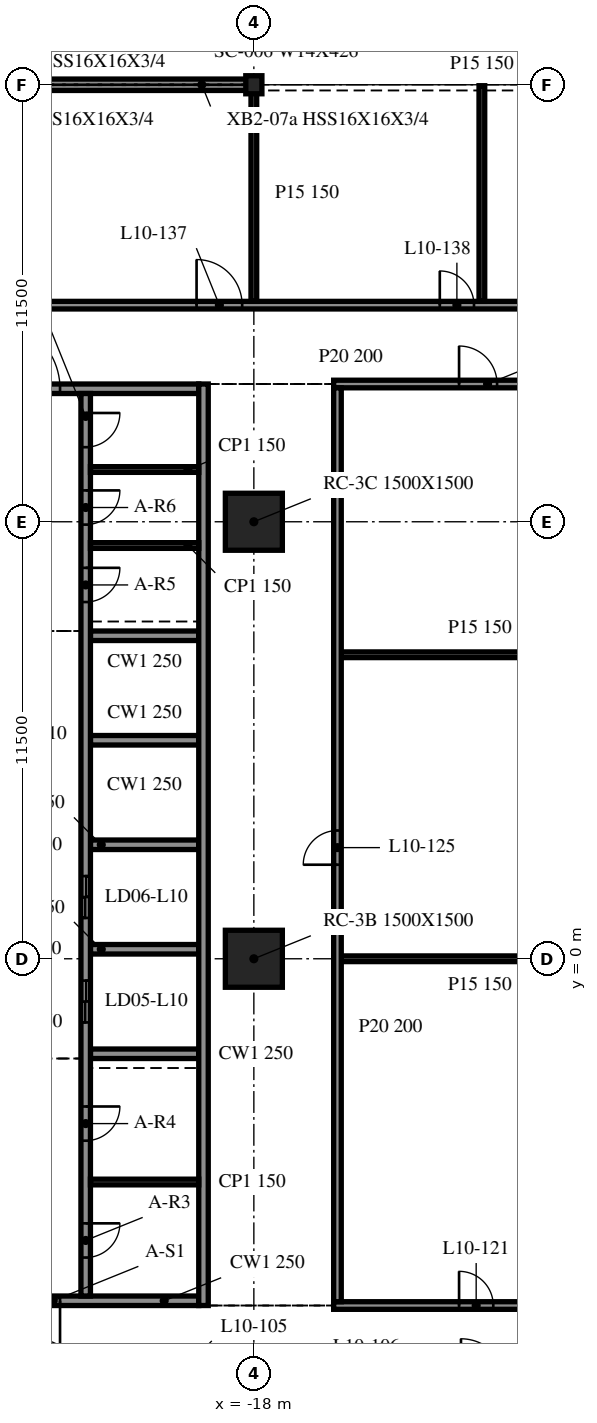
"""IFC4 building model, lengths in metres.
Left out: names, types, materials, properties, quantities, classifications, styles, units other than length and angle.
Written with IfcOpenShell. Run it as: python <this file> out.ifc"""

import sys

from ifc_helpers import new_model, si_unit, direction, frame, frame_2d, origin, origin_2d, place, context, subcontext, project, spatial, rectangle, i_section, extrude, element, fill, save


model = new_model("IFC4")
c1 = context("Model", 3, precision=1e-05, world=origin(), true_north=direction((0.0, 1.0)))
c2 = subcontext(c1, "Body", "Model", "MODEL_VIEW")
j1 = project(units=[si_unit("LENGTHUNIT", "METRE"), si_unit("PLANEANGLEUNIT", "RADIAN")], contexts=[c1])
p1 = place(None, origin())
s1 = spatial("IfcSite", under=j1, at=p1, CompositionType="ELEMENT")
p2 = place(p1, origin())
s2 = spatial("IfcBuilding", under=s1, at=p2, CompositionType="ELEMENT")
p3 = place(p2, frame((0.0, 0.0, 46.0)))
s3 = spatial("IfcBuildingStorey", under=s2, at=p3, CompositionType="ELEMENT", Elevation=46.0)
for number, where, z_axis, x_axis in (
    (1, (-18.0, 0.0, -0.34), (0.0, 0.0, 1.0), (1.0, 0.0, 0.0)),
    (2, (-18.0, 11.5, -0.34), (0.0, 0.0, 1.0), (1.0, 0.0, 0.0)),
):
    element("IfcColumn", number, at=place(p3, frame(where, z_axis=z_axis, x_axis=x_axis)), inside=s3, PredefinedType="COLUMN", context=c2, shape_type="SweptSolid", body=[
        extrude(rectangle(XDim=1.5, YDim=1.5, at=origin_2d()), origin(), (0.0, 0.0, 1.0), 4.3),
    ])
p4 = place(p3, frame((-18.0, 23.0, -0.34), z_axis=(0.0, 0.0, 1.0), x_axis=(1.0, 0.0, 0.0)))
e3 = element("IfcColumn", 3, at=p4, inside=s3, PredefinedType="COLUMN", context=c2, shape_type="SweptSolid", body=[
    extrude(i_section(OverallWidth=0.424, OverallDepth=0.475, WebThickness=0.048, FlangeThickness=0.077, at=origin_2d()), origin(), (0.0, 0.0, 1.0), 4.3),
])
p5 = place(p3, frame((-18.024, 23.0, 0.0), z_axis=(0.0, 0.0, 1.0), x_axis=(-1.0, 0.0, 0.0)))
e4 = element("IfcWall", 4, at=p5, inside=s3, PredefinedType="NOTDEFINED", context=c2, shape_type="SweptSolid", body=[
    extrude(rectangle(XDim=11.952, YDim=0.3, at=frame_2d((5.976, 0.0))), origin(), (0.0, 0.0, 1.0), 3.203),
])
p6 = place(p3, frame((-19.325, -9.125, 0.0), z_axis=(0.0, 0.0, 1.0), x_axis=(0.0, 1.0, 0.0)))
e5 = element("IfcWall", 5, at=p6, inside=s3, PredefinedType="SOLIDWALL", context=c2, shape_type="SweptSolid", body=[
    extrude(rectangle(XDim=24.25, YDim=0.25, at=frame_2d((12.125, 0.0))), origin(), (0.0, 0.0, 1.0), 3.96),
])
p7 = place(p3, frame((-19.45, -9.0, 0.0), z_axis=(0.0, 0.0, 1.0), x_axis=(-1.0, 0.0, 0.0)))
e6 = element("IfcWall", 6, at=p7, inside=s3, PredefinedType="SOLIDWALL", context=c2, shape_type="SweptSolid", body=[
    extrude(rectangle(XDim=9.1, YDim=0.25, at=frame_2d((4.55, 0.0))), origin(), (0.0, 0.0, 1.0), 3.96),
])
p8 = place(p7, frame((3.65, 0.0, 0.0)))
e7 = element("IfcOpeningElement", 7, at=p8, cuts=e6, PredefinedType="OPENING", context=c2, shape_type="SweptSolid", body=[
    extrude(rectangle(XDim=1.8, YDim=2.1, at=frame_2d((0.9, 1.05))), frame((0.0, 0.135, 0.0), z_axis=(0.0, -1.0, 0.0), x_axis=(1.0, 0.0, 0.0)), (0.0, 0.0, 1.0), 0.27),
])
p9 = place(p3, frame((-28.55, 15.0, 0.0), z_axis=(0.0, 0.0, 1.0), x_axis=(1.0, 0.0, 0.0)))
e8 = element("IfcWall", 8, at=p9, inside=s3, PredefinedType="SOLIDWALL", context=c2, shape_type="SweptSolid", body=[
    extrude(rectangle(XDim=9.1, YDim=0.25, at=frame_2d((4.55, 0.0))), origin(), (0.0, 0.0, 1.0), 3.96),
])
p10 = place(p9, frame((3.65, 0.0, 0.0)))
e9 = element("IfcOpeningElement", 9, at=p10, cuts=e8, PredefinedType="OPENING", context=c2, shape_type="SweptSolid", body=[
    extrude(rectangle(XDim=1.8, YDim=2.1, at=frame_2d((0.9, 1.05))), frame((0.0, 0.135, 0.0), z_axis=(0.0, -1.0, 0.0), x_axis=(1.0, 0.0, 0.0)), (0.0, 0.0, 1.0), 0.27),
])
p11 = place(p3, frame((-22.425, 14.875, 0.0), z_axis=(0.0, 0.0, 1.0), x_axis=(0.0, -1.0, 0.0)))
e10 = element("IfcWall", 10, at=p11, inside=s3, PredefinedType="SOLIDWALL", context=c2, shape_type="SweptSolid", body=[
    extrude(rectangle(XDim=23.75, YDim=0.25, at=frame_2d((11.875, 0.0))), origin(), (0.0, 0.0, 1.0), 3.96),
])
p12 = place(p11, frame((15.45, 0.0, 0.0)))
e11 = element("IfcOpeningElement", 11, at=p12, cuts=e10, PredefinedType="OPENING", context=c2, shape_type="SweptSolid", body=[
    extrude(rectangle(XDim=1.1, YDim=2.1, at=frame_2d((0.55, 1.05))), frame((0.0, 0.135, 0.0), z_axis=(0.0, -1.0, 0.0), x_axis=(1.0, 0.0, 0.0)), (0.0, 0.0, 1.0), 0.27),
])
p13 = place(p11, frame((12.7, 0.0, 0.0)))
e12 = element("IfcOpeningElement", 12, at=p13, cuts=e10, PredefinedType="OPENING", context=c2, shape_type="SweptSolid", body=[
    extrude(rectangle(XDim=1.1, YDim=2.1, at=frame_2d((0.55, 1.05))), frame((0.0, 0.135, 0.0), z_axis=(0.0, -1.0, 0.0), x_axis=(1.0, 0.0, 0.0)), (0.0, 0.0, 1.0), 0.27),
])
p14 = place(p11, frame((21.837, 0.0, 0.0)))
e13 = element("IfcOpeningElement", 13, at=p14, cuts=e10, PredefinedType="OPENING", context=c2, shape_type="SweptSolid", body=[
    extrude(rectangle(XDim=0.9, YDim=2.1, at=frame_2d((0.45, 1.05))), frame((0.0, 0.135, 0.0), z_axis=(0.0, -1.0, 0.0), x_axis=(1.0, 0.0, 0.0)), (0.0, 0.0, 1.0), 0.27),
])
p15 = place(p11, frame((18.762, 0.0, 0.0)))
e14 = element("IfcOpeningElement", 14, at=p15, cuts=e10, PredefinedType="OPENING", context=c2, shape_type="SweptSolid", body=[
    extrude(rectangle(XDim=0.9, YDim=2.1, at=frame_2d((0.45, 1.05))), frame((0.0, 0.135, 0.0), z_axis=(0.0, -1.0, 0.0), x_axis=(1.0, 0.0, 0.0)), (0.0, 0.0, 1.0), 0.27),
])
p16 = place(p11, frame((4.587, 0.0, 0.0)))
e15 = element("IfcOpeningElement", 15, at=p16, cuts=e10, PredefinedType="OPENING", context=c2, shape_type="SweptSolid", body=[
    extrude(rectangle(XDim=0.9, YDim=2.1, at=frame_2d((0.45, 1.05))), frame((0.0, 0.135, 0.0), z_axis=(0.0, -1.0, 0.0), x_axis=(1.0, 0.0, 0.0)), (0.0, 0.0, 1.0), 0.27),
])
p17 = place(p11, frame((2.55, 0.0, 0.0)))
e16 = element("IfcOpeningElement", 16, at=p17, cuts=e10, PredefinedType="OPENING", context=c2, shape_type="SweptSolid", body=[
    extrude(rectangle(XDim=0.9, YDim=2.1, at=frame_2d((0.45, 1.05))), frame((0.0, 0.135, 0.0), z_axis=(0.0, -1.0, 0.0), x_axis=(1.0, 0.0, 0.0)), (0.0, 0.0, 1.0), 0.27),
])
p18 = place(p11, frame((0.512, 0.0, 0.0)))
e17 = element("IfcOpeningElement", 17, at=p18, cuts=e10, PredefinedType="OPENING", context=c2, shape_type="SweptSolid", body=[
    extrude(rectangle(XDim=0.9, YDim=2.1, at=frame_2d((0.45, 1.05))), frame((0.0, 0.135, 0.0), z_axis=(0.0, -1.0, 0.0), x_axis=(1.0, 0.0, 0.0)), (0.0, 0.0, 1.0), 0.27),
])
for number, where, z_axis, x_axis in (
    (18, (-22.3, -2.5, 0.0), (0.0, 0.0, 1.0), (1.0, 0.0, 0.0)),
    (19, (-22.3, 0.25, 0.0), (0.0, 0.0, 1.0), (1.0, 0.0, 0.0)),
    (20, (-22.3, 3.0, 0.0), (0.0, 0.0, 1.0), (1.0, 0.0, 0.0)),
    (21, (-22.3, 5.75, 0.0), (0.0, 0.0, 1.0), (1.0, 0.0, 0.0)),
    (22, (-22.3, 8.5, 0.0), (0.0, 0.0, 1.0), (1.0, 0.0, 0.0)),
):
    element("IfcWall", number, at=place(p3, frame(where, z_axis=z_axis, x_axis=x_axis)), inside=s3, PredefinedType="SOLIDWALL", context=c2, shape_type="SweptSolid", body=[
        extrude(rectangle(XDim=2.85, YDim=0.25, at=frame_2d((1.425, 0.0))), origin(), (0.0, 0.0, 1.0), 3.96),
    ])
for number, where, z_axis, x_axis in (
    (23, (-22.3, -5.875, 0.0), (0.0, 0.0, 1.0), (1.0, 0.0, 0.0)),
    (24, (-22.3, 10.875, 0.0), (0.0, 0.0, 1.0), (1.0, 0.0, 0.0)),
    (25, (-22.3, 12.875, 0.0), (0.0, 0.0, 1.0), (1.0, 0.0, 0.0)),
):
    element("IfcWall", number, at=place(p3, frame(where, z_axis=z_axis, x_axis=x_axis)), inside=s3, PredefinedType="PARTITIONING", context=c2, shape_type="SweptSolid", body=[
        extrude(rectangle(XDim=2.85, YDim=0.15, at=frame_2d((1.425, 0.0))), origin(), (0.0, 0.0, 1.0), 3.96),
    ])
p19 = place(p3, frame((-15.9, -9.125, 0.0), z_axis=(0.0, 0.0, 1.0), x_axis=(1.0, 0.0, 0.0)))
e26 = element("IfcWall", 26, at=p19, inside=s3, PredefinedType="PARTITIONING", context=c2, shape_type="SweptSolid", body=[
    extrude(rectangle(XDim=7.7, YDim=0.2, at=frame_2d((3.85, 0.0))), origin(), (0.0, 0.0, 1.0), 3.96),
])
p20 = place(p19, frame((3.3, 0.0, 0.0)))
e27 = element("IfcOpeningElement", 27, at=p20, cuts=e26, PredefinedType="OPENING", context=c2, shape_type="SweptSolid", body=[
    extrude(rectangle(XDim=0.9, YDim=2.1, at=frame_2d((0.45, 1.05))), frame((0.0, 0.11, 0.0), z_axis=(0.0, -1.0, 0.0), x_axis=(1.0, 0.0, 0.0)), (0.0, 0.0, 1.0), 0.22),
])
for number, where, z_axis, x_axis in (
    (28, (-15.7, 0.0, 0.0), (0.0, 0.0, 1.0), (1.0, 0.0, 0.0)),
    (29, (-15.7, 8.0, 0.0), (0.0, 0.0, 1.0), (1.0, 0.0, 0.0)),
):
    element("IfcWall", number, at=place(p3, frame(where, z_axis=z_axis, x_axis=x_axis)), inside=s3, PredefinedType="PARTITIONING", context=c2, shape_type="SweptSolid", body=[
        extrude(rectangle(XDim=7.3, YDim=0.15, at=frame_2d((3.65, 0.0))), origin(), (0.0, 0.0, 1.0), 3.96),
    ])
p21 = place(p3, frame((-15.9, 15.125, 0.0), z_axis=(0.0, 0.0, 1.0), x_axis=(1.0, 0.0, 0.0)))
e30 = element("IfcWall", 30, at=p21, inside=s3, PredefinedType="PARTITIONING", context=c2, shape_type="SweptSolid", body=[
    extrude(rectangle(XDim=7.7, YDim=0.2, at=frame_2d((3.85, 0.0))), origin(), (0.0, 0.0, 1.0), 3.96),
])
p22 = place(p21, frame((3.3, 0.0, 0.0)))
e31 = element("IfcOpeningElement", 31, at=p22, cuts=e30, PredefinedType="OPENING", context=c2, shape_type="SweptSolid", body=[
    extrude(rectangle(XDim=1.0, YDim=2.1, at=frame_2d((0.5, 1.05))), frame((0.0, 0.11, 0.0), z_axis=(0.0, -1.0, 0.0), x_axis=(1.0, 0.0, 0.0)), (0.0, 0.0, 1.0), 0.22),
])
p23 = place(p3, frame((-41.807, 17.2, 0.0), z_axis=(0.0, 0.0, 1.0), x_axis=(1.0, 0.0, 0.0)))
e32 = element("IfcWall", 32, at=p23, inside=s3, PredefinedType="PARTITIONING", context=c2, shape_type="SweptSolid", body=[
    extrude(rectangle(XDim=95.615, YDim=0.2, at=frame_2d((47.807, 0.0))), origin(), (0.0, 0.0, 1.0), 3.96),
])
p24 = place(p23, frame((7.5, 0.0, 0.0)))
e33 = element("IfcOpeningElement", 33, at=p24, cuts=e32, PredefinedType="OPENING", context=c2, shape_type="SweptSolid", body=[
    extrude(rectangle(XDim=1.0, YDim=2.1, at=frame_2d((0.5, 1.05))), frame((0.0, 0.11, 0.0), z_axis=(0.0, -1.0, 0.0), x_axis=(1.0, 0.0, 0.0)), (0.0, 0.0, 1.0), 0.22),
])
p25 = place(p23, frame((10.9, 0.0, 0.0)))
e34 = element("IfcOpeningElement", 34, at=p25, cuts=e32, PredefinedType="OPENING", context=c2, shape_type="SweptSolid", body=[
    extrude(rectangle(XDim=1.0, YDim=2.1, at=frame_2d((0.5, 1.05))), frame((0.0, 0.11, 0.0), z_axis=(0.0, -1.0, 0.0), x_axis=(1.0, 0.0, 0.0)), (0.0, 0.0, 1.0), 0.22),
])
p26 = place(p23, frame((13.7, 0.0, 0.0)))
e35 = element("IfcOpeningElement", 35, at=p26, cuts=e32, PredefinedType="OPENING", context=c2, shape_type="SweptSolid", body=[
    extrude(rectangle(XDim=0.9, YDim=2.1, at=frame_2d((0.45, 1.05))), frame((0.0, 0.11, 0.0), z_axis=(0.0, -1.0, 0.0), x_axis=(1.0, 0.0, 0.0)), (0.0, 0.0, 1.0), 0.22),
])
p27 = place(p23, frame((22.3, 0.0, 0.0)))
e36 = element("IfcOpeningElement", 36, at=p27, cuts=e32, PredefinedType="OPENING", context=c2, shape_type="SweptSolid", body=[
    extrude(rectangle(XDim=1.2, YDim=2.1, at=frame_2d((0.6, 1.05))), frame((0.0, 0.11, 0.0), z_axis=(0.0, -1.0, 0.0), x_axis=(1.0, 0.0, 0.0)), (0.0, 0.0, 1.0), 0.22),
])
p28 = place(p23, frame((28.7, 0.0, 0.0)))
e37 = element("IfcOpeningElement", 37, at=p28, cuts=e32, PredefinedType="OPENING", context=c2, shape_type="SweptSolid", body=[
    extrude(rectangle(XDim=0.9, YDim=2.1, at=frame_2d((0.45, 1.05))), frame((0.0, 0.11, 0.0), z_axis=(0.0, -1.0, 0.0), x_axis=(1.0, 0.0, 0.0)), (0.0, 0.0, 1.0), 0.22),
])
p29 = place(p23, frame((37.5, 0.0, 0.0)))
e38 = element("IfcOpeningElement", 38, at=p29, cuts=e32, PredefinedType="OPENING", context=c2, shape_type="SweptSolid", body=[
    extrude(rectangle(XDim=1.0, YDim=2.1, at=frame_2d((0.5, 1.05))), frame((0.0, 0.11, 0.0), z_axis=(0.0, -1.0, 0.0), x_axis=(1.0, 0.0, 0.0)), (0.0, 0.0, 1.0), 0.22),
])
p30 = place(p23, frame((40.9, 0.0, 0.0)))
e39 = element("IfcOpeningElement", 39, at=p30, cuts=e32, PredefinedType="OPENING", context=c2, shape_type="SweptSolid", body=[
    extrude(rectangle(XDim=1.0, YDim=2.1, at=frame_2d((0.5, 1.05))), frame((0.0, 0.11, 0.0), z_axis=(0.0, -1.0, 0.0), x_axis=(1.0, 0.0, 0.0)), (0.0, 0.0, 1.0), 0.22),
])
p31 = place(p23, frame((43.7, 0.0, 0.0)))
e40 = element("IfcOpeningElement", 40, at=p31, cuts=e32, PredefinedType="OPENING", context=c2, shape_type="SweptSolid", body=[
    extrude(rectangle(XDim=0.9, YDim=2.1, at=frame_2d((0.45, 1.05))), frame((0.0, 0.11, 0.0), z_axis=(0.0, -1.0, 0.0), x_axis=(1.0, 0.0, 0.0)), (0.0, 0.0, 1.0), 0.22),
])
p32 = place(p23, frame((47.3, 0.0, 0.0)))
e41 = element("IfcOpeningElement", 41, at=p32, cuts=e32, PredefinedType="OPENING", context=c2, shape_type="SweptSolid", body=[
    extrude(rectangle(XDim=1.2, YDim=2.1, at=frame_2d((0.6, 1.05))), frame((0.0, 0.11, 0.0), z_axis=(0.0, -1.0, 0.0), x_axis=(1.0, 0.0, 0.0)), (0.0, 0.0, 1.0), 0.22),
])
p33 = place(p23, frame((54.1, 0.0, 0.0)))
e42 = element("IfcOpeningElement", 42, at=p33, cuts=e32, PredefinedType="OPENING", context=c2, shape_type="SweptSolid", body=[
    extrude(rectangle(XDim=0.9, YDim=2.1, at=frame_2d((0.45, 1.05))), frame((0.0, 0.11, 0.0), z_axis=(0.0, -1.0, 0.0), x_axis=(1.0, 0.0, 0.0)), (0.0, 0.0, 1.0), 0.22),
])
p34 = place(p23, frame((60.1, 0.0, 0.0)))
e43 = element("IfcOpeningElement", 43, at=p34, cuts=e32, PredefinedType="OPENING", context=c2, shape_type="SweptSolid", body=[
    extrude(rectangle(XDim=1.0, YDim=2.1, at=frame_2d((0.5, 1.05))), frame((0.0, 0.11, 0.0), z_axis=(0.0, -1.0, 0.0), x_axis=(1.0, 0.0, 0.0)), (0.0, 0.0, 1.0), 0.22),
])
p35 = place(p23, frame((69.1, 0.0, 0.0)))
e44 = element("IfcOpeningElement", 44, at=p35, cuts=e32, PredefinedType="OPENING", context=c2, shape_type="SweptSolid", body=[
    extrude(rectangle(XDim=1.0, YDim=2.1, at=frame_2d((0.5, 1.05))), frame((0.0, 0.11, 0.0), z_axis=(0.0, -1.0, 0.0), x_axis=(1.0, 0.0, 0.0)), (0.0, 0.0, 1.0), 0.22),
])
p36 = place(p23, frame((72.5, 0.0, 0.0)))
e45 = element("IfcOpeningElement", 45, at=p36, cuts=e32, PredefinedType="OPENING", context=c2, shape_type="SweptSolid", body=[
    extrude(rectangle(XDim=0.9, YDim=2.1, at=frame_2d((0.45, 1.05))), frame((0.0, 0.11, 0.0), z_axis=(0.0, -1.0, 0.0), x_axis=(1.0, 0.0, 0.0)), (0.0, 0.0, 1.0), 0.22),
])
p37 = place(p23, frame((75.1, 0.0, 0.0)))
e46 = element("IfcOpeningElement", 46, at=p37, cuts=e32, PredefinedType="OPENING", context=c2, shape_type="SweptSolid", body=[
    extrude(rectangle(XDim=1.2, YDim=2.1, at=frame_2d((0.6, 1.05))), frame((0.0, 0.11, 0.0), z_axis=(0.0, -1.0, 0.0), x_axis=(1.0, 0.0, 0.0)), (0.0, 0.0, 1.0), 0.22),
])
p38 = place(p23, frame((84.1, 0.0, 0.0)))
e47 = element("IfcOpeningElement", 47, at=p38, cuts=e32, PredefinedType="OPENING", context=c2, shape_type="SweptSolid", body=[
    extrude(rectangle(XDim=0.9, YDim=2.1, at=frame_2d((0.45, 1.05))), frame((0.0, 0.11, 0.0), z_axis=(0.0, -1.0, 0.0), x_axis=(1.0, 0.0, 0.0)), (0.0, 0.0, 1.0), 0.22),
])
p39 = place(p23, frame((90.1, 0.0, 0.0)))
e48 = element("IfcOpeningElement", 48, at=p39, cuts=e32, PredefinedType="OPENING", context=c2, shape_type="SweptSolid", body=[
    extrude(rectangle(XDim=1.0, YDim=2.1, at=frame_2d((0.5, 1.05))), frame((0.0, 0.11, 0.0), z_axis=(0.0, -1.0, 0.0), x_axis=(1.0, 0.0, 0.0)), (0.0, 0.0, 1.0), 0.22),
])
p40 = place(p3, frame((-18.0, 17.3, 0.0), z_axis=(0.0, 0.0, 1.0), x_axis=(0.0, 1.0, 0.0)))
e49 = element("IfcWall", 49, at=p40, inside=s3, PredefinedType="PARTITIONING", context=c2, shape_type="SweptSolid", body=[
    extrude(rectangle(XDim=5.675, YDim=0.15, at=frame_2d((2.837, 0.0))), origin(), (0.0, 0.0, 1.0), 3.96),
])
p41 = place(p3, frame((-15.8, -9.025, 0.0), z_axis=(0.0, 0.0, 1.0), x_axis=(0.0, 1.0, 0.0)))
e50 = element("IfcWall", 50, at=p41, inside=s3, PredefinedType="PARTITIONING", context=c2, shape_type="SweptSolid", body=[
    extrude(rectangle(XDim=24.05, YDim=0.2, at=frame_2d((12.025, 0.0))), origin(), (0.0, 0.0, 1.0), 3.96),
])
p42 = place(p41, frame((11.5, 0.0, 0.0)))
e51 = element("IfcOpeningElement", 51, at=p42, cuts=e50, PredefinedType="OPENING", context=c2, shape_type="SweptSolid", body=[
    extrude(rectangle(XDim=0.9, YDim=2.1, at=frame_2d((0.45, 1.05))), frame((0.0, 0.11, 0.0), z_axis=(0.0, -1.0, 0.0), x_axis=(1.0, 0.0, 0.0)), (0.0, 0.0, 1.0), 0.22),
])
p43 = place(p3, frame((-12.0, 17.3, 0.0), z_axis=(0.0, 0.0, 1.0), x_axis=(0.0, 1.0, 0.0)))
e52 = element("IfcWall", 52, at=p43, inside=s3, PredefinedType="PARTITIONING", context=c2, shape_type="SweptSolid", body=[
    extrude(rectangle(XDim=5.675, YDim=0.15, at=frame_2d((2.837, 0.0))), origin(), (0.0, 0.0, 1.0), 3.96),
])
p44 = place(p8, origin())
e53 = element("IfcDoor", 53, at=p44, inside=s3, OperationType="DOUBLE_DOOR_SINGLE_SWING", PredefinedType="DOOR", context=c2, shape_type="SweptSolid", body=[
    extrude(rectangle(XDim=1.8, YDim=2.1, at=frame_2d((0.9, 1.05))), frame((0.0, 0.025, 0.0), z_axis=(0.0, -1.0, 0.0), x_axis=(1.0, 0.0, 0.0)), (0.0, 0.0, 1.0), 0.05),
])
fill(e7, e53)
p45 = place(p10, origin())
e54 = element("IfcDoor", 54, at=p45, inside=s3, OperationType="DOUBLE_DOOR_SINGLE_SWING", PredefinedType="DOOR", context=c2, shape_type="SweptSolid", body=[
    extrude(rectangle(XDim=1.8, YDim=2.1, at=frame_2d((0.9, 1.05))), frame((0.0, 0.025, 0.0), z_axis=(0.0, -1.0, 0.0), x_axis=(1.0, 0.0, 0.0)), (0.0, 0.0, 1.0), 0.05),
])
fill(e9, e54)
p46 = place(p12, origin())
e55 = element("IfcDoor", 55, at=p46, inside=s3, OperationType="DOUBLE_DOOR_SLIDING", PredefinedType="DOOR", context=c2, shape_type="SweptSolid", body=[
    extrude(rectangle(XDim=1.1, YDim=2.1, at=frame_2d((0.55, 1.05))), frame((0.0, 0.025, 0.0), z_axis=(0.0, -1.0, 0.0), x_axis=(1.0, 0.0, 0.0)), (0.0, 0.0, 1.0), 0.05),
])
fill(e11, e55)
p47 = place(p13, origin())
e56 = element("IfcDoor", 56, at=p47, inside=s3, OperationType="DOUBLE_DOOR_SLIDING", PredefinedType="DOOR", context=c2, shape_type="SweptSolid", body=[
    extrude(rectangle(XDim=1.1, YDim=2.1, at=frame_2d((0.55, 1.05))), frame((0.0, 0.025, 0.0), z_axis=(0.0, -1.0, 0.0), x_axis=(1.0, 0.0, 0.0)), (0.0, 0.0, 1.0), 0.05),
])
fill(e12, e56)
p48 = place(p14, origin())
e57 = element("IfcDoor", 57, at=p48, inside=s3, OperationType="SINGLE_SWING_LEFT", PredefinedType="DOOR", context=c2, shape_type="SweptSolid", body=[
    extrude(rectangle(XDim=0.9, YDim=2.1, at=frame_2d((0.45, 1.05))), frame((0.0, 0.025, 0.0), z_axis=(0.0, -1.0, 0.0), x_axis=(1.0, 0.0, 0.0)), (0.0, 0.0, 1.0), 0.05),
])
fill(e13, e57)
p49 = place(p15, origin())
e58 = element("IfcDoor", 58, at=p49, inside=s3, OperationType="SINGLE_SWING_RIGHT", PredefinedType="DOOR", context=c2, shape_type="SweptSolid", body=[
    extrude(rectangle(XDim=0.9, YDim=2.1, at=frame_2d((0.45, 1.05))), frame((0.0, 0.025, 0.0), z_axis=(0.0, -1.0, 0.0), x_axis=(1.0, 0.0, 0.0)), (0.0, 0.0, 1.0), 0.05),
])
fill(e14, e58)
p50 = place(p16, origin())
e59 = element("IfcDoor", 59, at=p50, inside=s3, OperationType="SINGLE_SWING_LEFT", PredefinedType="DOOR", context=c2, shape_type="SweptSolid", body=[
    extrude(rectangle(XDim=0.9, YDim=2.1, at=frame_2d((0.45, 1.05))), frame((0.0, 0.025, 0.0), z_axis=(0.0, -1.0, 0.0), x_axis=(1.0, 0.0, 0.0)), (0.0, 0.0, 1.0), 0.05),
])
fill(e15, e59)
p51 = place(p17, origin())
e60 = element("IfcDoor", 60, at=p51, inside=s3, OperationType="SINGLE_SWING_RIGHT", PredefinedType="DOOR", context=c2, shape_type="SweptSolid", body=[
    extrude(rectangle(XDim=0.9, YDim=2.1, at=frame_2d((0.45, 1.05))), frame((0.0, 0.025, 0.0), z_axis=(0.0, -1.0, 0.0), x_axis=(1.0, 0.0, 0.0)), (0.0, 0.0, 1.0), 0.05),
])
fill(e16, e60)
p52 = place(p18, origin())
e61 = element("IfcDoor", 61, at=p52, inside=s3, OperationType="SINGLE_SWING_LEFT", PredefinedType="DOOR", context=c2, shape_type="SweptSolid", body=[
    extrude(rectangle(XDim=0.9, YDim=2.1, at=frame_2d((0.45, 1.05))), frame((0.0, 0.025, 0.0), z_axis=(0.0, -1.0, 0.0), x_axis=(1.0, 0.0, 0.0)), (0.0, 0.0, 1.0), 0.05),
])
fill(e17, e61)
p53 = place(p20, origin())
e62 = element("IfcDoor", 62, at=p53, inside=s3, OperationType="SINGLE_SWING_LEFT", PredefinedType="DOOR", context=c2, shape_type="SweptSolid", body=[
    extrude(rectangle(XDim=0.9, YDim=2.1, at=frame_2d((0.45, 1.05))), frame((0.0, 0.025, 0.0), z_axis=(0.0, -1.0, 0.0), x_axis=(1.0, 0.0, 0.0)), (0.0, 0.0, 1.0), 0.05),
])
fill(e27, e62)
p54 = place(p42, origin())
e63 = element("IfcDoor", 63, at=p54, inside=s3, OperationType="SINGLE_SWING_RIGHT", PredefinedType="DOOR", context=c2, shape_type="SweptSolid", body=[
    extrude(rectangle(XDim=0.9, YDim=2.1, at=frame_2d((0.45, 1.05))), frame((0.0, 0.025, 0.0), z_axis=(0.0, -1.0, 0.0), x_axis=(1.0, 0.0, 0.0)), (0.0, 0.0, 1.0), 0.05),
])
fill(e51, e63)
p55 = place(p22, origin())
e64 = element("IfcDoor", 64, at=p55, inside=s3, OperationType="SINGLE_SWING_RIGHT", PredefinedType="DOOR", context=c2, shape_type="SweptSolid", body=[
    extrude(rectangle(XDim=1.0, YDim=2.1, at=frame_2d((0.5, 1.05))), frame((0.0, 0.025, 0.0), z_axis=(0.0, -1.0, 0.0), x_axis=(1.0, 0.0, 0.0)), (0.0, 0.0, 1.0), 0.05),
])
fill(e31, e64)
p56 = place(p27, origin())
e65 = element("IfcDoor", 65, at=p56, inside=s3, OperationType="SINGLE_SWING_LEFT", PredefinedType="DOOR", context=c2, shape_type="SweptSolid", body=[
    extrude(rectangle(XDim=1.2, YDim=2.1, at=frame_2d((0.6, 1.05))), frame((0.0, 0.025, 0.0), z_axis=(0.0, -1.0, 0.0), x_axis=(1.0, 0.0, 0.0)), (0.0, 0.0, 1.0), 0.05),
])
fill(e36, e65)
p57 = place(p28, origin())
e66 = element("IfcDoor", 66, at=p57, inside=s3, OperationType="SINGLE_SWING_LEFT", PredefinedType="DOOR", context=c2, shape_type="SweptSolid", body=[
    extrude(rectangle(XDim=0.9, YDim=2.1, at=frame_2d((0.45, 1.05))), frame((0.0, 0.025, 0.0), z_axis=(0.0, -1.0, 0.0), x_axis=(1.0, 0.0, 0.0)), (0.0, 0.0, 1.0), 0.05),
])
fill(e37, e66)
save(model, sys.argv[1])
